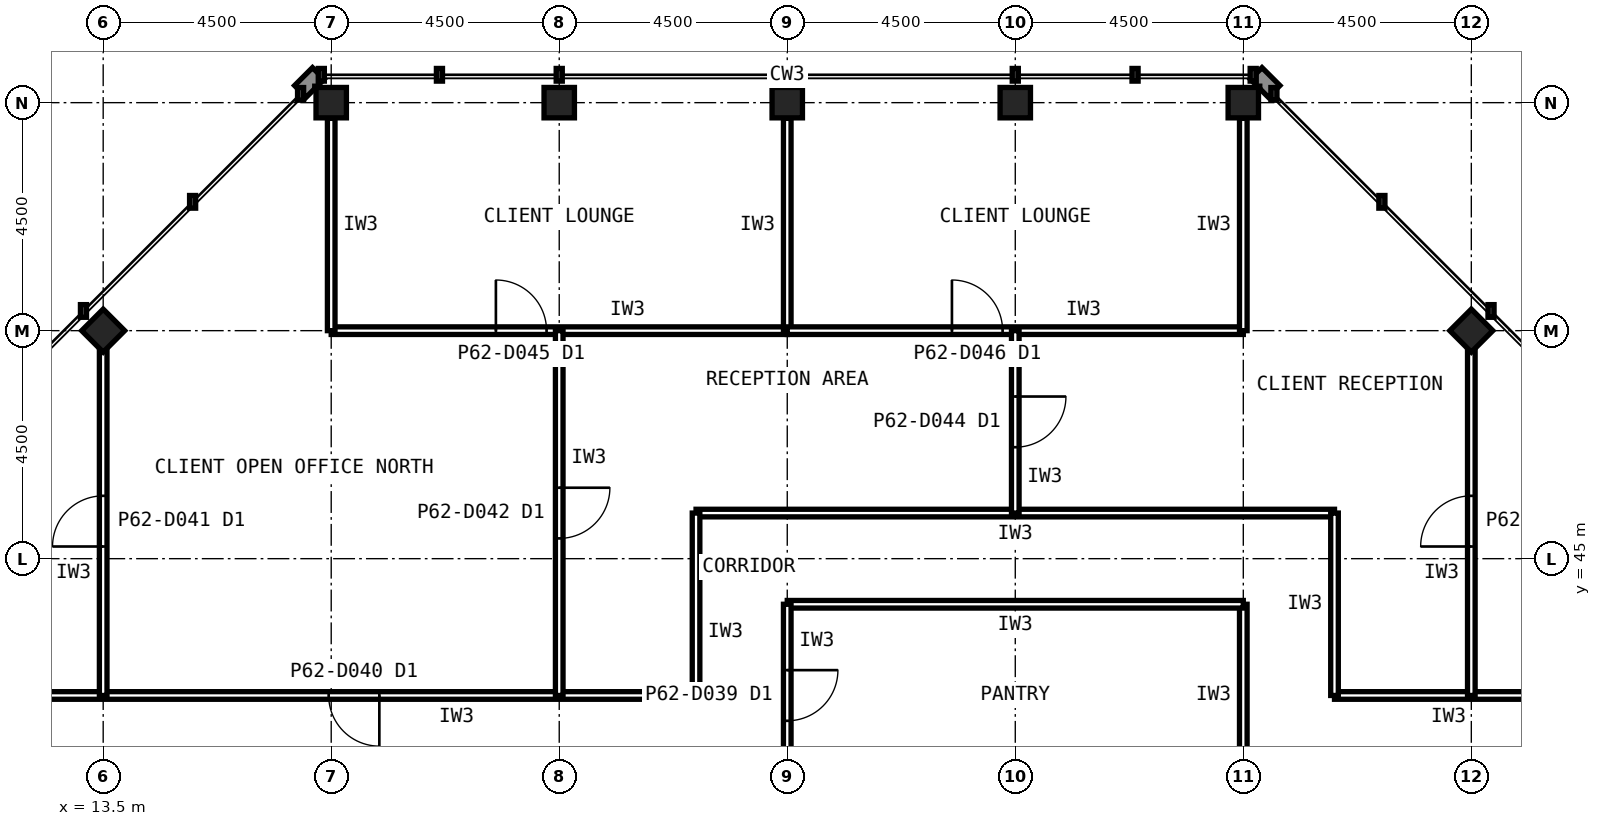
"""IFC4 building model, lengths in metres.
Left out: names, types, materials, properties, quantities, classifications, styles, units other than length and angle.
Written with IfcOpenShell. Run it as: python <this file> out.ifc"""

import sys

from ifc_helpers import new_model, si_unit, direction, frame, frame_2d, origin, origin_2d, place, context, subcontext, project, spatial, rectangle, hollow_rectangle, extrude, element, fill, save


model = new_model("IFC4")
c1 = context("Model", 3, precision=1e-05, world=origin(), true_north=direction((0.0, 1.0)))
c2 = subcontext(c1, "Body", "Model", "MODEL_VIEW")
j1 = project(units=[si_unit("LENGTHUNIT", "METRE"), si_unit("PLANEANGLEUNIT", "RADIAN")], contexts=[c1])
p1 = place(None, origin())
s1 = spatial("IfcSite", under=j1, at=p1, CompositionType="ELEMENT")
p2 = place(p1, origin())
s2 = spatial("IfcBuilding", under=s1, at=p2, CompositionType="ELEMENT")
p3 = place(p2, frame((0.0, 0.0, 262.6)))
s3 = spatial("IfcBuildingStorey", under=s2, at=p3, CompositionType="ELEMENT", Elevation=262.6)
for number, where, z_axis, x_axis in (
    (1, (36.0, 54.0, 0.0), (0.0, 0.0, 1.0), (1.0, 0.0, 0.0)),
    (2, (31.5, 54.0, 0.0), (0.0, 0.0, 1.0), (1.0, 0.0, 0.0)),
    (3, (27.0, 54.0, 0.0), (0.0, 0.0, 1.0), (1.0, 0.0, 0.0)),
    (4, (22.5, 54.0, 0.0), (0.0, 0.0, 1.0), (1.0, 0.0, 0.0)),
    (5, (18.0, 54.0, 0.0), (0.0, 0.0, 1.0), (1.0, 0.0, 0.0)),
    (6, (40.5, 49.5, 0.0), (0.0, 0.0, 1.0), (0.707, 0.707, 0.0)),
    (7, (13.5, 49.5, 0.0), (0.0, 0.0, 1.0), (0.707, 0.707, 0.0)),
):
    element("IfcColumn", number, at=place(p3, frame(where, z_axis=z_axis, x_axis=x_axis)), inside=s3, PredefinedType="COLUMN", context=c2, shape_type="SweptSolid", body=[
        extrude(hollow_rectangle(XDim=0.6, YDim=0.6, WallThickness=0.028, at=origin_2d()), origin(), (0.0, 0.0, 1.0), 4.0),
    ])
p4 = place(p3, frame((25.2, 42.3, 0.0), z_axis=(0.0, 0.0, 1.0), x_axis=(-1.0, 0.0, 0.0)))
e8 = element("IfcWall", 8, at=p4, inside=s3, PredefinedType="PARTITIONING", context=c2, shape_type="SweptSolid", body=[
    extrude(rectangle(XDim=13.5, YDim=0.15, at=frame_2d((6.75, 0.0))), origin(), (0.0, 0.0, 1.0), 3.84),
])
p5 = place(p4, frame((6.25, 0.0, 0.0)))
e9 = element("IfcOpeningElement", 9, at=p5, cuts=e8, PredefinedType="OPENING", context=c2, shape_type="SweptSolid", body=[
    extrude(rectangle(XDim=1.0, YDim=2.1, at=frame_2d((0.5, 1.05))), frame((0.0, 0.085, 0.0), z_axis=(0.0, -1.0, 0.0), x_axis=(1.0, 0.0, 0.0)), (0.0, 0.0, 1.0), 0.17),
])
p6 = place(p3, frame((37.8, 45.9, 0.0), z_axis=(0.0, 0.0, 1.0), x_axis=(-1.0, 0.0, 0.0)))
e10 = element("IfcWall", 10, at=p6, inside=s3, PredefinedType="PARTITIONING", context=c2, shape_type="SweptSolid", body=[
    extrude(rectangle(XDim=12.6, YDim=0.15, at=frame_2d((6.3, 0.0))), origin(), (0.0, 0.0, 1.0), 3.84),
])
p7 = place(p3, frame((42.3, 42.3, 0.0), z_axis=(0.0, 0.0, 1.0), x_axis=(-1.0, 0.0, 0.0)))
e11 = element("IfcWall", 11, at=p7, inside=s3, PredefinedType="PARTITIONING", context=c2, shape_type="SweptSolid", body=[
    extrude(rectangle(XDim=4.5, YDim=0.15, at=frame_2d((2.25, 0.0))), origin(), (0.0, 0.0, 1.0), 3.84),
])
for number, where, z_axis, x_axis in (
    (12, (25.2, 45.9, 0.0), (0.0, 0.0, 1.0), (0.0, -1.0, 0.0)),
    (13, (37.8, 42.3, 0.0), (0.0, 0.0, 1.0), (0.0, 1.0, 0.0)),
):
    element("IfcWall", number, at=place(p3, frame(where, z_axis=z_axis, x_axis=x_axis)), inside=s3, PredefinedType="PARTITIONING", context=c2, shape_type="SweptSolid", body=[
        extrude(rectangle(XDim=3.6, YDim=0.15, at=frame_2d((1.8, 0.0))), origin(), (0.0, 0.0, 1.0), 3.84),
    ])
p8 = place(p3, frame((36.0, 40.5, 0.0), z_axis=(0.0, 0.0, 1.0), x_axis=(0.0, 1.0, 0.0)))
e14 = element("IfcWall", 14, at=p8, inside=s3, PredefinedType="PARTITIONING", context=c2, shape_type="SweptSolid", body=[
    extrude(rectangle(XDim=3.6, YDim=0.15, at=frame_2d((1.8, 0.0))), origin(), (0.0, 0.0, 1.0), 2.989),
])
p9 = place(p3, frame((36.0, 44.1, 0.0), z_axis=(0.0, 0.0, 1.0), x_axis=(-1.0, 0.0, 0.0)))
e15 = element("IfcWall", 15, at=p9, inside=s3, PredefinedType="PARTITIONING", context=c2, shape_type="SweptSolid", body=[
    extrude(rectangle(XDim=9.0, YDim=0.15, at=frame_2d((4.5, 0.0))), origin(), (0.0, 0.0, 1.0), 3.84),
])
p10 = place(p3, frame((27.0, 44.1, 0.0), z_axis=(0.0, 0.0, 1.0), x_axis=(0.0, -1.0, 0.0)))
e16 = element("IfcWall", 16, at=p10, inside=s3, PredefinedType="PARTITIONING", context=c2, shape_type="SweptSolid", body=[
    extrude(rectangle(XDim=3.6, YDim=0.15, at=frame_2d((1.8, 0.0))), origin(), (0.0, 0.0, 1.0), 2.989),
])
p11 = place(p10, frame((1.3, 0.0, 0.0)))
e17 = element("IfcOpeningElement", 17, at=p11, cuts=e16, PredefinedType="OPENING", context=c2, shape_type="SweptSolid", body=[
    extrude(rectangle(XDim=1.0, YDim=2.1, at=frame_2d((0.5, 1.05))), frame((0.0, 0.085, 0.0), z_axis=(0.0, -1.0, 0.0), x_axis=(1.0, 0.0, 0.0)), (0.0, 0.0, 1.0), 0.17),
])
p12 = place(p3, frame((18.0, 49.5, 0.0), z_axis=(0.0, 0.0, 1.0), x_axis=(1.0, 0.0, 0.0)))
e18 = element("IfcWall", 18, at=p12, inside=s3, PredefinedType="PARTITIONING", context=c2, shape_type="SweptSolid", body=[
    extrude(rectangle(XDim=9.0, YDim=0.15, at=frame_2d((4.5, 0.0))), origin(), (0.0, 0.0, 1.0), 3.84),
])
p13 = place(p12, frame((3.25, 0.0, 0.0)))
e19 = element("IfcOpeningElement", 19, at=p13, cuts=e18, PredefinedType="OPENING", context=c2, shape_type="SweptSolid", body=[
    extrude(rectangle(XDim=1.0, YDim=2.1, at=frame_2d((0.5, 1.05))), frame((0.0, 0.085, 0.0), z_axis=(0.0, -1.0, 0.0), x_axis=(1.0, 0.0, 0.0)), (0.0, 0.0, 1.0), 0.17),
])
for number, where, z_axis, x_axis in (
    (20, (27.0, 49.5, 0.0), (0.0, 0.0, 1.0), (0.0, 1.0, 0.0)),
    (21, (18.0, 53.69, 0.0), (0.0, 0.0, 1.0), (0.0, -1.0, 0.0)),
):
    element("IfcWall", number, at=place(p3, frame(where, z_axis=z_axis, x_axis=x_axis)), inside=s3, PredefinedType="PARTITIONING", context=c2, shape_type="SweptSolid", body=[
        extrude(rectangle(XDim=4.19, YDim=0.15, at=frame_2d((2.095, 0.0))), origin(), (0.0, 0.0, 1.0), 2.989),
    ])
p14 = place(p3, frame((27.0, 49.5, 0.0), z_axis=(0.0, 0.0, 1.0), x_axis=(1.0, 0.0, 0.0)))
e22 = element("IfcWall", 22, at=p14, inside=s3, PredefinedType="PARTITIONING", context=c2, shape_type="SweptSolid", body=[
    extrude(rectangle(XDim=9.0, YDim=0.15, at=frame_2d((4.5, 0.0))), origin(), (0.0, 0.0, 1.0), 3.84),
])
p15 = place(p14, frame((3.25, 0.0, 0.0)))
e23 = element("IfcOpeningElement", 23, at=p15, cuts=e22, PredefinedType="OPENING", context=c2, shape_type="SweptSolid", body=[
    extrude(rectangle(XDim=1.0, YDim=2.1, at=frame_2d((0.5, 1.05))), frame((0.0, 0.085, 0.0), z_axis=(0.0, -1.0, 0.0), x_axis=(1.0, 0.0, 0.0)), (0.0, 0.0, 1.0), 0.17),
])
p16 = place(p3, frame((36.0, 49.5, 0.0), z_axis=(0.0, 0.0, 1.0), x_axis=(0.0, 1.0, 0.0)))
e24 = element("IfcWall", 24, at=p16, inside=s3, PredefinedType="PARTITIONING", context=c2, shape_type="SweptSolid", body=[
    extrude(rectangle(XDim=4.19, YDim=0.15, at=frame_2d((2.095, 0.0))), origin(), (0.0, 0.0, 1.0), 2.989),
])
p17 = place(p3, frame((22.5, 49.5, 0.0), z_axis=(0.0, 0.0, 1.0), x_axis=(0.0, -1.0, 0.0)))
e25 = element("IfcWall", 25, at=p17, inside=s3, PredefinedType="PARTITIONING", context=c2, shape_type="SweptSolid", body=[
    extrude(rectangle(XDim=7.2, YDim=0.15, at=frame_2d((3.6, 0.0))), origin(), (0.0, 0.0, 1.0), 2.989),
])
p18 = place(p17, frame((3.1, 0.0, 0.0)))
e26 = element("IfcOpeningElement", 26, at=p18, cuts=e25, PredefinedType="OPENING", context=c2, shape_type="SweptSolid", body=[
    extrude(rectangle(XDim=1.0, YDim=2.1, at=frame_2d((0.5, 1.05))), frame((0.0, 0.085, 0.0), z_axis=(0.0, -1.0, 0.0), x_axis=(1.0, 0.0, 0.0)), (0.0, 0.0, 1.0), 0.17),
])
p19 = place(p3, frame((13.5, 42.3, 0.0), z_axis=(0.0, 0.0, 1.0), x_axis=(0.0, 1.0, 0.0)))
e27 = element("IfcWall", 27, at=p19, inside=s3, PredefinedType="PARTITIONING", context=c2, shape_type="SweptSolid", body=[
    extrude(rectangle(XDim=6.88, YDim=0.15, at=frame_2d((3.44, 0.0))), origin(), (0.0, 0.0, 1.0), 2.989),
])
p20 = place(p19, frame((2.94, 0.0, 0.0)))
e28 = element("IfcOpeningElement", 28, at=p20, cuts=e27, PredefinedType="OPENING", context=c2, shape_type="SweptSolid", body=[
    extrude(rectangle(XDim=1.0, YDim=2.1, at=frame_2d((0.5, 1.05))), frame((0.0, 0.085, 0.0), z_axis=(0.0, -1.0, 0.0), x_axis=(1.0, 0.0, 0.0)), (0.0, 0.0, 1.0), 0.17),
])
p21 = place(p3, frame((40.5, 42.3, 0.0), z_axis=(0.0, 0.0, 1.0), x_axis=(0.0, 1.0, 0.0)))
e29 = element("IfcWall", 29, at=p21, inside=s3, PredefinedType="PARTITIONING", context=c2, shape_type="SweptSolid", body=[
    extrude(rectangle(XDim=6.88, YDim=0.15, at=frame_2d((3.44, 0.0))), origin(), (0.0, 0.0, 1.0), 2.989),
])
p22 = place(p21, frame((2.94, 0.0, 0.0)))
e30 = element("IfcOpeningElement", 30, at=p22, cuts=e29, PredefinedType="OPENING", context=c2, shape_type="SweptSolid", body=[
    extrude(rectangle(XDim=1.0, YDim=2.1, at=frame_2d((0.5, 1.05))), frame((0.0, 0.085, 0.0), z_axis=(0.0, -1.0, 0.0), x_axis=(1.0, 0.0, 0.0)), (0.0, 0.0, 1.0), 0.17),
])
p23 = place(p3, frame((31.5, 49.5, 0.0), z_axis=(0.0, 0.0, 1.0), x_axis=(0.0, -1.0, 0.0)))
e31 = element("IfcWall", 31, at=p23, inside=s3, PredefinedType="PARTITIONING", context=c2, shape_type="SweptSolid", body=[
    extrude(rectangle(XDim=3.6, YDim=0.15, at=frame_2d((1.8, 0.0))), origin(), (0.0, 0.0, 1.0), 2.989),
])
p24 = place(p23, frame((1.3, 0.0, 0.0)))
e32 = element("IfcOpeningElement", 32, at=p24, cuts=e31, PredefinedType="OPENING", context=c2, shape_type="SweptSolid", body=[
    extrude(rectangle(XDim=1.0, YDim=2.1, at=frame_2d((0.5, 1.05))), frame((0.0, 0.085, 0.0), z_axis=(0.0, -1.0, 0.0), x_axis=(1.0, 0.0, 0.0)), (0.0, 0.0, 1.0), 0.17),
])
p25 = place(p5, origin())
e33 = element("IfcDoor", 33, at=p25, inside=s3, OperationType="SINGLE_SWING_LEFT", PredefinedType="DOOR", context=c2, shape_type="SweptSolid", body=[
    extrude(rectangle(XDim=1.0, YDim=2.1, at=frame_2d((0.5, 1.05))), frame((0.0, 0.025, 0.0), z_axis=(0.0, -1.0, 0.0), x_axis=(1.0, 0.0, 0.0)), (0.0, 0.0, 1.0), 0.05),
])
fill(e9, e33)
p26 = place(p11, origin())
e34 = element("IfcDoor", 34, at=p26, inside=s3, OperationType="SINGLE_SWING_LEFT", PredefinedType="DOOR", context=c2, shape_type="SweptSolid", body=[
    extrude(rectangle(XDim=1.0, YDim=2.1, at=frame_2d((0.5, 1.05))), frame((0.0, 0.025, 0.0), z_axis=(0.0, -1.0, 0.0), x_axis=(1.0, 0.0, 0.0)), (0.0, 0.0, 1.0), 0.05),
])
fill(e17, e34)
p27 = place(p13, origin())
e35 = element("IfcDoor", 35, at=p27, inside=s3, OperationType="SINGLE_SWING_LEFT", PredefinedType="DOOR", context=c2, shape_type="SweptSolid", body=[
    extrude(rectangle(XDim=1.0, YDim=2.1, at=frame_2d((0.5, 1.05))), frame((0.0, 0.025, 0.0), z_axis=(0.0, -1.0, 0.0), x_axis=(1.0, 0.0, 0.0)), (0.0, 0.0, 1.0), 0.05),
])
fill(e19, e35)
p28 = place(p15, origin())
e36 = element("IfcDoor", 36, at=p28, inside=s3, OperationType="SINGLE_SWING_LEFT", PredefinedType="DOOR", context=c2, shape_type="SweptSolid", body=[
    extrude(rectangle(XDim=1.0, YDim=2.1, at=frame_2d((0.5, 1.05))), frame((0.0, 0.025, 0.0), z_axis=(0.0, -1.0, 0.0), x_axis=(1.0, 0.0, 0.0)), (0.0, 0.0, 1.0), 0.05),
])
fill(e23, e36)
p29 = place(p18, origin())
e37 = element("IfcDoor", 37, at=p29, inside=s3, OperationType="SINGLE_SWING_LEFT", PredefinedType="DOOR", context=c2, shape_type="SweptSolid", body=[
    extrude(rectangle(XDim=1.0, YDim=2.1, at=frame_2d((0.5, 1.05))), frame((0.0, 0.025, 0.0), z_axis=(0.0, -1.0, 0.0), x_axis=(1.0, 0.0, 0.0)), (0.0, 0.0, 1.0), 0.05),
])
fill(e26, e37)
p30 = place(p20, origin())
e38 = element("IfcDoor", 38, at=p30, inside=s3, OperationType="SINGLE_SWING_LEFT", PredefinedType="DOOR", context=c2, shape_type="SweptSolid", body=[
    extrude(rectangle(XDim=1.0, YDim=2.1, at=frame_2d((0.5, 1.05))), frame((0.0, 0.025, 0.0), z_axis=(0.0, -1.0, 0.0), x_axis=(1.0, 0.0, 0.0)), (0.0, 0.0, 1.0), 0.05),
])
fill(e28, e38)
p31 = place(p22, origin())
e39 = element("IfcDoor", 39, at=p31, inside=s3, OperationType="SINGLE_SWING_LEFT", PredefinedType="DOOR", context=c2, shape_type="SweptSolid", body=[
    extrude(rectangle(XDim=1.0, YDim=2.1, at=frame_2d((0.5, 1.05))), frame((0.0, 0.025, 0.0), z_axis=(0.0, -1.0, 0.0), x_axis=(1.0, 0.0, 0.0)), (0.0, 0.0, 1.0), 0.05),
])
fill(e30, e39)
p32 = place(p24, origin())
e40 = element("IfcDoor", 40, at=p32, inside=s3, OperationType="SINGLE_SWING_LEFT", PredefinedType="DOOR", context=c2, shape_type="SweptSolid", body=[
    extrude(rectangle(XDim=1.0, YDim=2.1, at=frame_2d((0.5, 1.05))), frame((0.0, 0.025, 0.0), z_axis=(0.0, -1.0, 0.0), x_axis=(1.0, 0.0, 0.0)), (0.0, 0.0, 1.0), 0.05),
])
fill(e32, e40)
save(model, sys.argv[1])
